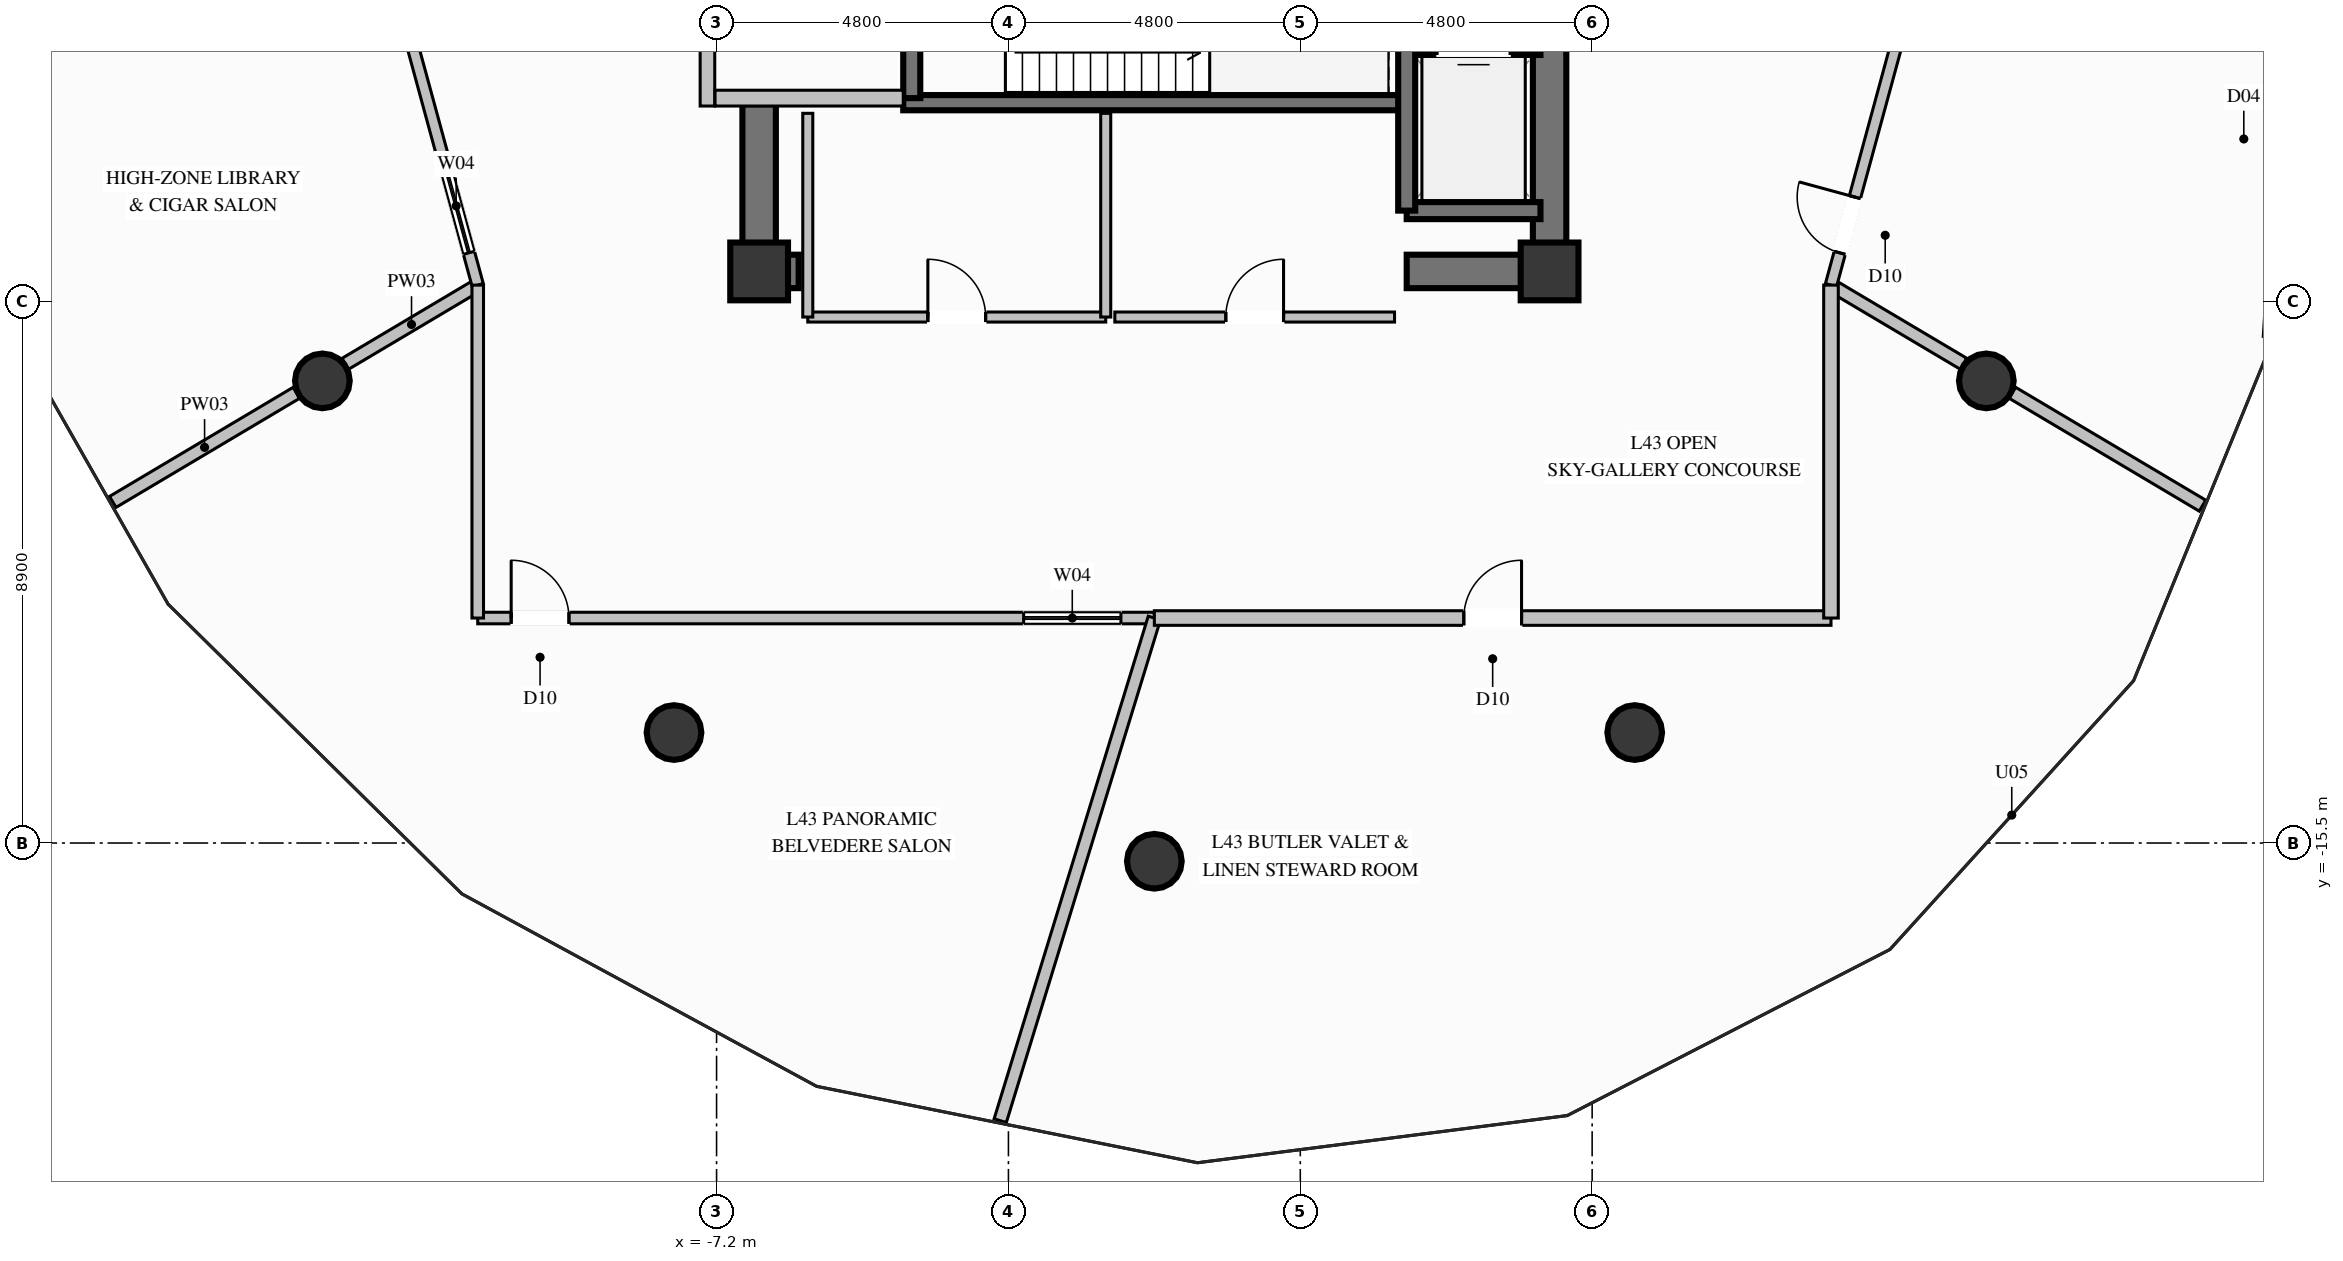
"""IFC4 building model, lengths in metres.
Left out: names, types, materials, properties, quantities, classifications, styles, units other than length and angle.
Written with IfcOpenShell. Run it as: python <this file> out.ifc"""

import sys

from ifc_helpers import new_model, si_unit, direction, frame, frame_2d, origin, origin_2d, place, context, subcontext, project, spatial, rectangle, circle, extrude, element, fill, save


model = new_model("IFC4")
c1 = context("Model", 3, precision=1e-05, world=origin(), true_north=direction((0.0, 1.0)))
c2 = subcontext(c1, "Body", "Model", "MODEL_VIEW")
j1 = project(units=[si_unit("LENGTHUNIT", "METRE"), si_unit("PLANEANGLEUNIT", "RADIAN")], contexts=[c1])
p1 = place(None, origin())
s1 = spatial("IfcSite", under=j1, at=p1, CompositionType="ELEMENT")
p2 = place(p1, origin())
s2 = spatial("IfcBuilding", under=s1, at=p2, CompositionType="ELEMENT")
p3 = place(p2, frame((0.0, 0.0, 168.6)))
s3 = spatial("IfcBuildingStorey", under=s2, at=p3, CompositionType="ELEMENT", Elevation=168.6)
for number, where, z_axis, x_axis in (
    (1, (-6.5, -6.1, 0.0), (0.0, 0.0, 1.0), (1.0, 0.0, 0.0)),
    (2, (6.5, -6.1, 0.0), (0.0, 0.0, 1.0), (1.0, 0.0, 0.0)),
):
    element("IfcColumn", number, at=place(p3, frame(where, z_axis=z_axis, x_axis=x_axis)), inside=s3, PredefinedType="COLUMN", context=c2, shape_type="SweptSolid", body=[
        extrude(rectangle(XDim=0.95, YDim=0.95, at=origin_2d()), origin(), (0.0, 0.0, 1.0), 4.6),
    ])
p4 = place(p3, frame((-4.13, -3.325, 0.0), z_axis=(0.0, 0.0, 1.0), x_axis=(1.0, 0.0, 0.0)))
e3 = element("IfcWall", 3, at=p4, inside=s3, PredefinedType="SOLIDWALL", context=c2, shape_type="SweptSolid", body=[
    extrude(rectangle(XDim=8.26, YDim=0.25, at=frame_2d((4.13, 0.0))), origin(), (0.0, 0.0, 1.0), 4.6),
])
p5 = place(p3, frame((-6.225, -6.1, 0.0), z_axis=(0.0, 0.0, 1.0), x_axis=(1.0, 0.0, 0.0)))
e4 = element("IfcWall", 4, at=p5, inside=s3, PredefinedType="SHEAR", context=c2, shape_type="SweptSolid", body=[
    extrude(rectangle(XDim=0.375, YDim=0.55, at=frame_2d((0.188, 0.0))), origin(), (0.0, 0.0, 1.0), 4.6),
])
p6 = place(p3, frame((4.15, -6.1, 0.0), z_axis=(0.0, 0.0, 1.0), x_axis=(1.0, 0.0, 0.0)))
e5 = element("IfcWall", 5, at=p6, inside=s3, PredefinedType="SHEAR", context=c2, shape_type="SweptSolid", body=[
    extrude(rectangle(XDim=2.075, YDim=0.55, at=frame_2d((1.038, 0.0))), origin(), (0.0, 0.0, 1.0), 4.6),
])
p7 = place(p3, frame((-6.5, -6.375, 0.0), z_axis=(0.0, 0.0, 1.0), x_axis=(0.0, 1.0, 0.0)))
e6 = element("IfcWall", 6, at=p7, inside=s3, PredefinedType="SHEAR", context=c2, shape_type="SweptSolid", body=[
    extrude(rectangle(XDim=3.025, YDim=0.55, at=frame_2d((1.512, 0.0))), origin(), (0.0, 0.0, 1.0), 4.6),
])
p8 = place(p3, frame((6.5, -6.375, 0.0), z_axis=(0.0, 0.0, 1.0), x_axis=(0.0, 1.0, 0.0)))
e7 = element("IfcWall", 7, at=p8, inside=s3, PredefinedType="SHEAR", context=c2, shape_type="SweptSolid", body=[
    extrude(rectangle(XDim=4.025, YDim=0.55, at=frame_2d((2.012, 0.0))), origin(), (0.0, 0.0, 1.0), 4.6),
])
for number, where, z_axis, x_axis in (
    (8, (-13.683, -7.9, 0.0), (0.0, 0.0, 1.0), (1.0, 0.0, 0.0)),
    (9, (-7.9, -13.683, 0.0), (0.0, 0.0, 1.0), (1.0, 0.0, 0.0)),
    (10, (0.0, -15.8, 0.0), (0.0, 0.0, 1.0), (1.0, 0.0, 0.0)),
    (11, (7.9, -13.683, 0.0), (0.0, 0.0, 1.0), (1.0, 0.0, 0.0)),
    (12, (13.683, -7.9, 0.0), (0.0, 0.0, 1.0), (1.0, 0.0, 0.0)),
):
    element("IfcColumn", number, at=place(p3, frame(where, z_axis=z_axis, x_axis=x_axis)), inside=s3, PredefinedType="COLUMN", context=c2, shape_type="SweptSolid", body=[
        extrude(circle(Radius=0.45, at=origin_2d()), origin(), (0.0, 0.0, 1.0), 4.6),
    ])
p9 = place(p3, frame((4.15, -5.1, 0.0), z_axis=(0.0, 0.0, 1.0), x_axis=(1.0, 0.0, 0.0)))
e13 = element("IfcWall", 13, at=p9, inside=s3, PredefinedType="SOLIDWALL", context=c2, shape_type="SweptSolid", body=[
    extrude(rectangle(XDim=2.2, YDim=0.28, at=frame_2d((1.1, 0.0))), origin(), (0.0, 0.0, 1.0), 4.36),
])
p10 = place(p3, frame((6.35, -2.4, 0.0), z_axis=(0.0, 0.0, 1.0), x_axis=(-1.0, 0.0, 0.0)))
e14 = element("IfcWall", 14, at=p10, inside=s3, PredefinedType="SOLIDWALL", context=c2, shape_type="SweptSolid", body=[
    extrude(rectangle(XDim=2.2, YDim=0.28, at=frame_2d((1.1, 0.0))), origin(), (0.0, 0.0, 1.0), 4.36),
])
p11 = place(p10, frame((0.5, 0.0, 0.0)))
e15 = element("IfcOpeningElement", 15, at=p11, cuts=e14, PredefinedType="OPENING", context=c2, shape_type="SweptSolid", body=[
    extrude(rectangle(XDim=1.2, YDim=2.2, at=frame_2d((0.6, 1.1))), frame((0.0, 0.15, 0.0), z_axis=(0.0, -1.0, 0.0), x_axis=(1.0, 0.0, 0.0)), (0.0, 0.0, 1.0), 0.3),
])
p12 = place(p3, frame((4.15, -2.4, 0.0), z_axis=(0.0, 0.0, 1.0), x_axis=(0.0, -1.0, 0.0)))
e16 = element("IfcWall", 16, at=p12, inside=s3, PredefinedType="SOLIDWALL", context=c2, shape_type="SweptSolid", body=[
    extrude(rectangle(XDim=2.7, YDim=0.28, at=frame_2d((1.35, 0.0))), origin(), (0.0, 0.0, 1.0), 4.36),
])
p13 = place(p3, frame((-3.99, -3.25, 0.0), z_axis=(0.0, 0.0, 1.0), x_axis=(0.0, 1.0, 0.0)))
e17 = element("IfcWall", 17, at=p13, inside=s3, PredefinedType="SOLIDWALL", context=c2, shape_type="SweptSolid", body=[
    extrude(rectangle(XDim=5.46, YDim=0.28, at=frame_2d((2.73, 0.0))), origin(), (0.0, 0.0, 1.0), 4.36),
])
p14 = place(p13, frame((0.937, 0.0, 0.0)))
e18 = element("IfcOpeningElement", 18, at=p14, cuts=e17, PredefinedType="OPENING", context=c2, shape_type="SweptSolid", body=[
    extrude(rectangle(XDim=1.2, YDim=2.2, at=frame_2d((0.6, 1.1))), frame((0.0, 0.15, 0.0), z_axis=(0.0, -1.0, 0.0), x_axis=(1.0, 0.0, 0.0)), (0.0, 0.0, 1.0), 0.3),
])
p15 = place(p3, frame((-7.35, -3.38, 0.0), z_axis=(0.0, 0.0, 1.0), x_axis=(0.0, 1.0, 0.0)))
e19 = element("IfcWall", 19, at=p15, inside=s3, PredefinedType="PARTITIONING", context=c2, shape_type="SweptSolid", body=[
    extrude(rectangle(XDim=5.72, YDim=0.24, at=frame_2d((2.86, 0.0))), origin(), (0.0, 0.0, 1.0), 3.245),
])
p16 = place(p15, frame((1.599, 0.0, 0.0)))
e20 = element("IfcOpeningElement", 20, at=p16, cuts=e19, PredefinedType="OPENING", context=c2, shape_type="SweptSolid", body=[
    extrude(rectangle(XDim=1.15, YDim=2.2, at=frame_2d((0.575, 1.1))), frame((0.0, 0.13, 0.0), z_axis=(0.0, -1.0, 0.0), x_axis=(1.0, 0.0, 0.0)), (0.0, 0.0, 1.0), 0.26),
])
p17 = place(p3, frame((-7.225, -3.25, 0.0), z_axis=(0.0, 0.0, 1.0), x_axis=(1.0, 0.0, 0.0)))
e21 = element("IfcWall", 21, at=p17, inside=s3, PredefinedType="PARTITIONING", context=c2, shape_type="SweptSolid", body=[
    extrude(rectangle(XDim=3.095, YDim=0.26, at=frame_2d((1.548, 0.0))), origin(), (0.0, 0.0, 1.0), 4.36),
])
p18 = place(p3, frame((-5.7, -6.85, 0.0), z_axis=(0.0, 0.0, 1.0), x_axis=(1.0, 0.0, 0.0)))
e22 = element("IfcWall", 22, at=p18, inside=s3, PredefinedType="PARTITIONING", context=c2, shape_type="SweptSolid", body=[
    extrude(rectangle(XDim=4.9, YDim=0.165, at=frame_2d((2.45, 0.0))), origin(), (0.0, 0.0, 1.0), 3.245),
])
p19 = place(p18, frame((1.975, 0.0, 0.0)))
e23 = element("IfcOpeningElement", 23, at=p19, cuts=e22, PredefinedType="OPENING", context=c2, shape_type="SweptSolid", body=[
    extrude(rectangle(XDim=0.95, YDim=2.1, at=frame_2d((0.475, 1.05))), frame((0.0, 0.093, 0.0), z_axis=(0.0, -1.0, 0.0), x_axis=(1.0, 0.0, 0.0)), (0.0, 0.0, 1.0), 0.185),
])
p20 = place(p3, frame((-0.8, -6.85, 0.0), z_axis=(0.0, 0.0, 1.0), x_axis=(0.0, 1.0, 0.0)))
e24 = element("IfcWall", 24, at=p20, inside=s3, PredefinedType="PARTITIONING", context=c2, shape_type="SweptSolid", body=[
    extrude(rectangle(XDim=3.35, YDim=0.165, at=frame_2d((1.675, 0.0))), origin(), (0.0, 0.0, 1.0), 4.36),
])
p21 = place(p3, frame((-5.7, -3.5, 0.0), z_axis=(0.0, 0.0, 1.0), x_axis=(0.0, -1.0, 0.0)))
e25 = element("IfcWall", 25, at=p21, inside=s3, PredefinedType="PARTITIONING", context=c2, shape_type="SweptSolid", body=[
    extrude(rectangle(XDim=3.35, YDim=0.165, at=frame_2d((1.675, 0.0))), origin(), (0.0, 0.0, 1.0), 3.245),
])
p22 = place(p3, frame((-0.65, -6.85, 0.0), z_axis=(0.0, 0.0, 1.0), x_axis=(1.0, 0.0, 0.0)))
e26 = element("IfcWall", 26, at=p22, inside=s3, PredefinedType="PARTITIONING", context=c2, shape_type="SweptSolid", body=[
    extrude(rectangle(XDim=4.6, YDim=0.165, at=frame_2d((2.3, 0.0))), origin(), (0.0, 0.0, 1.0), 3.245),
])
p23 = place(p22, frame((1.825, 0.0, 0.0)))
e27 = element("IfcOpeningElement", 27, at=p23, cuts=e26, PredefinedType="OPENING", context=c2, shape_type="SweptSolid", body=[
    extrude(rectangle(XDim=0.95, YDim=2.1, at=frame_2d((0.475, 1.05))), frame((0.0, 0.093, 0.0), z_axis=(0.0, -1.0, 0.0), x_axis=(1.0, 0.0, 0.0)), (0.0, 0.0, 1.0), 0.185),
])
p24 = place(p3, frame((-11.128, -6.325, 0.0), z_axis=(0.0, 0.0, 1.0), x_axis=(-0.85972118737, -0.510763624377, 0.0)))
e28 = element("IfcWall", 28, at=p24, inside=s3, PredefinedType="PARTITIONING", context=c2, shape_type="SweptSolid", body=[
    extrude(rectangle(XDim=2.533, YDim=0.21, at=frame_2d((1.267, 0.0))), origin(), (0.0, 0.0, 1.0), 3.877),
])
p25 = place(p3, frame((-14.11, -8.096, 0.0), z_axis=(0.0, 0.0, 1.0), x_axis=(-0.859673605407, -0.510843706203, 0.0)))
e29 = element("IfcWall", 29, at=p25, inside=s3, PredefinedType="PARTITIONING", context=c2, shape_type="SweptSolid", body=[
    extrude(rectangle(XDim=3.514, YDim=0.21, at=frame_2d((1.757, 0.0))), origin(), (0.0, 0.0, 1.0), 4.36),
])
p26 = place(p3, frame((11.128, -6.325, 0.0), z_axis=(0.0, 0.0, 1.0), x_axis=(0.859990866092, -0.510309425975, 0.0)))
e30 = element("IfcWall", 30, at=p26, inside=s3, PredefinedType="PARTITIONING", context=c2, shape_type="SweptSolid", body=[
    extrude(rectangle(XDim=2.534, YDim=0.21, at=frame_2d((1.267, 0.0))), origin(), (0.0, 0.0, 1.0), 3.877),
])
p27 = place(p3, frame((14.11, -8.095, 0.0), z_axis=(0.0, 0.0, 1.0), x_axis=(0.859887888036, -0.510482928224, 0.0)))
e31 = element("IfcWall", 31, at=p27, inside=s3, PredefinedType="PARTITIONING", context=c2, shape_type="SweptSolid", body=[
    extrude(rectangle(XDim=3.638, YDim=0.21, at=frame_2d((1.819, 0.0))), origin(), (0.0, 0.0, 1.0), 4.36),
])
p28 = place(p3, frame((-12.85, 0.0, 0.0), z_axis=(0.0, 0.0, 1.0), x_axis=(0.262717156474, -0.964872890952, 0.0)))
e32 = element("IfcWall", 32, at=p28, inside=s3, PredefinedType="PARTITIONING", context=c2, shape_type="SweptSolid", body=[
    extrude(rectangle(XDim=6.555, YDim=0.19, at=frame_2d((3.278, 0.0))), origin(), (0.0, 0.0, 1.0), 4.36),
])
p29 = place(p28, frame((0.55, 0.0, 0.0)))
e33 = element("IfcOpeningElement", 33, at=p29, cuts=e32, PredefinedType="OPENING", context=c2, shape_type="SweptSolid", body=[
    extrude(rectangle(XDim=0.95, YDim=2.1, at=frame_2d((0.475, 1.05))), frame((0.0, 0.105, 0.0), z_axis=(0.0, -1.0, 0.0), x_axis=(1.0, 0.0, 0.0)), (0.0, 0.0, 1.0), 0.21),
])
p30 = place(p28, frame((4.405, 0.0, 0.9)))
e34 = element("IfcOpeningElement", 34, at=p30, cuts=e32, PredefinedType="OPENING", context=c2, shape_type="SweptSolid", body=[
    extrude(rectangle(XDim=1.6, YDim=1.4, at=frame_2d((0.8, 0.7))), frame((0.0, 0.105, 0.0), z_axis=(0.0, -1.0, 0.0), x_axis=(1.0, 0.0, 0.0)), (0.0, 0.0, 1.0), 0.21),
])
p31 = place(p3, frame((11.128, -6.325, 0.0), z_axis=(0.0, 0.0, 1.0), x_axis=(0.262717156474, 0.964872890952, 0.0)))
e35 = element("IfcWall", 35, at=p31, inside=s3, PredefinedType="PARTITIONING", context=c2, shape_type="SweptSolid", body=[
    extrude(rectangle(XDim=6.555, YDim=0.19, at=frame_2d((3.278, 0.0))), origin(), (0.0, 0.0, 1.0), 4.36),
])
p32 = place(p31, frame((0.55, 0.0, 0.0)))
e36 = element("IfcOpeningElement", 36, at=p32, cuts=e35, PredefinedType="OPENING", context=c2, shape_type="SweptSolid", body=[
    extrude(rectangle(XDim=0.95, YDim=2.1, at=frame_2d((0.475, 1.05))), frame((0.0, 0.105, 0.0), z_axis=(0.0, -1.0, 0.0), x_axis=(1.0, 0.0, 0.0)), (0.0, 0.0, 1.0), 0.21),
])
p33 = place(p31, frame((4.405, 0.0, 0.9)))
e37 = element("IfcOpeningElement", 37, at=p33, cuts=e35, PredefinedType="OPENING", context=c2, shape_type="SweptSolid", body=[
    extrude(rectangle(XDim=1.6, YDim=1.4, at=frame_2d((0.8, 0.7))), frame((0.0, 0.105, 0.0), z_axis=(0.0, -1.0, 0.0), x_axis=(1.0, 0.0, 0.0)), (0.0, 0.0, 1.0), 0.21),
])
p34 = place(p3, frame((-11.128, -11.8, 0.0), z_axis=(0.0, 0.0, 1.0), x_axis=(1.0, 0.0, 0.0)))
e38 = element("IfcWall", 38, at=p34, inside=s3, PredefinedType="PARTITIONING", context=c2, shape_type="SweptSolid", body=[
    extrude(rectangle(XDim=11.128, YDim=0.19, at=frame_2d((5.564, 0.0))), origin(), (0.0, 0.0, 1.0), 4.36),
])
p35 = place(p34, frame((0.55, 0.0, 0.0)))
e39 = element("IfcOpeningElement", 39, at=p35, cuts=e38, PredefinedType="OPENING", context=c2, shape_type="SweptSolid", body=[
    extrude(rectangle(XDim=0.95, YDim=2.1, at=frame_2d((0.475, 1.05))), frame((0.0, 0.105, 0.0), z_axis=(0.0, -1.0, 0.0), x_axis=(1.0, 0.0, 0.0)), (0.0, 0.0, 1.0), 0.21),
])
p36 = place(p34, frame((8.978, 0.0, 0.9)))
e40 = element("IfcOpeningElement", 40, at=p36, cuts=e38, PredefinedType="OPENING", context=c2, shape_type="SweptSolid", body=[
    extrude(rectangle(XDim=1.6, YDim=1.4, at=frame_2d((0.8, 0.7))), frame((0.0, 0.105, 0.0), z_axis=(0.0, -1.0, 0.0), x_axis=(1.0, 0.0, 0.0)), (0.0, 0.0, 1.0), 0.21),
])
p37 = place(p3, frame((-11.128, -6.325, 0.0), z_axis=(0.0, 0.0, 1.0), x_axis=(0.0, -1.0, 0.0)))
e41 = element("IfcWall", 41, at=p37, inside=s3, PredefinedType="PARTITIONING", context=c2, shape_type="SweptSolid", body=[
    extrude(rectangle(XDim=5.475, YDim=0.19, at=frame_2d((2.738, 0.0))), origin(), (0.0, 0.0, 1.0), 4.36),
])
p38 = place(p3, frame((0.0, -11.8, 0.0), z_axis=(0.0, 0.0, 1.0), x_axis=(-0.293194775158, -0.956052730669, 0.0)))
e42 = element("IfcWall", 42, at=p38, inside=s3, PredefinedType="PARTITIONING", context=c2, shape_type="SweptSolid", body=[
    extrude(rectangle(XDim=8.646, YDim=0.21, at=frame_2d((4.323, 0.0))), origin(), (0.0, 0.0, 1.0), 4.36),
])
p39 = place(p3, frame((0.0, -11.8, 0.0), z_axis=(0.0, 0.0, 1.0), x_axis=(1.0, 0.0, 0.0)))
e43 = element("IfcWall", 43, at=p39, inside=s3, PredefinedType="PARTITIONING", context=c2, shape_type="SweptSolid", body=[
    extrude(rectangle(XDim=11.128, YDim=0.24, at=frame_2d((5.564, 0.0))), origin(), (0.0, 0.0, 1.0), 4.36),
])
p40 = place(p39, frame((5.089, 0.0, 0.0)))
e44 = element("IfcOpeningElement", 44, at=p40, cuts=e43, PredefinedType="OPENING", context=c2, shape_type="SweptSolid", body=[
    extrude(rectangle(XDim=0.95, YDim=2.1, at=frame_2d((0.475, 1.05))), frame((0.0, 0.13, 0.0), z_axis=(0.0, -1.0, 0.0), x_axis=(1.0, 0.0, 0.0)), (0.0, 0.0, 1.0), 0.26),
])
p41 = place(p3, frame((11.128, -11.8, 0.0), z_axis=(0.0, 0.0, 1.0), x_axis=(0.0, 1.0, 0.0)))
e45 = element("IfcWall", 45, at=p41, inside=s3, PredefinedType="PARTITIONING", context=c2, shape_type="SweptSolid", body=[
    extrude(rectangle(XDim=5.475, YDim=0.24, at=frame_2d((2.738, 0.0))), origin(), (0.0, 0.0, 1.0), 4.36),
])
p42 = place(p19, origin())
e46 = element("IfcDoor", 46, at=p42, inside=s3, OperationType="SINGLE_SWING_LEFT", PredefinedType="DOOR", context=c2, shape_type="SweptSolid", body=[
    extrude(rectangle(XDim=0.95, YDim=2.1, at=frame_2d((0.475, 1.05))), frame((0.0, 0.025, 0.0), z_axis=(0.0, -1.0, 0.0), x_axis=(1.0, 0.0, 0.0)), (0.0, 0.0, 1.0), 0.05),
])
fill(e23, e46)
p43 = place(p23, origin())
e47 = element("IfcDoor", 47, at=p43, inside=s3, OperationType="SINGLE_SWING_RIGHT", PredefinedType="DOOR", context=c2, shape_type="SweptSolid", body=[
    extrude(rectangle(XDim=0.95, YDim=2.1, at=frame_2d((0.475, 1.05))), frame((0.0, 0.025, 0.0), z_axis=(0.0, -1.0, 0.0), x_axis=(1.0, 0.0, 0.0)), (0.0, 0.0, 1.0), 0.05),
])
fill(e27, e47)
p44 = place(p30, origin())
e48 = element("IfcWindow", 48, at=p44, inside=s3, PartitioningType="SINGLE_PANEL", PredefinedType="WINDOW", context=c2, shape_type="SweptSolid", body=[
    extrude(rectangle(XDim=1.6, YDim=1.4, at=frame_2d((0.8, 0.7))), frame((0.0, 0.03, 0.0), z_axis=(0.0, -1.0, 0.0), x_axis=(1.0, 0.0, 0.0)), (0.0, 0.0, 1.0), 0.06),
])
fill(e34, e48)
p45 = place(p32, origin())
e49 = element("IfcDoor", 49, at=p45, inside=s3, OperationType="SINGLE_SWING_RIGHT", PredefinedType="DOOR", context=c2, shape_type="SweptSolid", body=[
    extrude(rectangle(XDim=0.95, YDim=2.1, at=frame_2d((0.475, 1.05))), frame((0.0, 0.025, 0.0), z_axis=(0.0, -1.0, 0.0), x_axis=(1.0, 0.0, 0.0)), (0.0, 0.0, 1.0), 0.05),
])
fill(e36, e49)
p46 = place(p35, origin())
e50 = element("IfcDoor", 50, at=p46, inside=s3, OperationType="SINGLE_SWING_LEFT", PredefinedType="DOOR", context=c2, shape_type="SweptSolid", body=[
    extrude(rectangle(XDim=0.95, YDim=2.1, at=frame_2d((0.475, 1.05))), frame((0.0, 0.025, 0.0), z_axis=(0.0, -1.0, 0.0), x_axis=(1.0, 0.0, 0.0)), (0.0, 0.0, 1.0), 0.05),
])
fill(e39, e50)
p47 = place(p36, origin())
e51 = element("IfcWindow", 51, at=p47, inside=s3, PartitioningType="SINGLE_PANEL", PredefinedType="WINDOW", context=c2, shape_type="SweptSolid", body=[
    extrude(rectangle(XDim=1.6, YDim=1.4, at=frame_2d((0.8, 0.7))), frame((0.0, 0.03, 0.0), z_axis=(0.0, -1.0, 0.0), x_axis=(1.0, 0.0, 0.0)), (0.0, 0.0, 1.0), 0.06),
])
fill(e40, e51)
p48 = place(p40, origin())
e52 = element("IfcDoor", 52, at=p48, inside=s3, OperationType="SINGLE_SWING_RIGHT", PredefinedType="DOOR", context=c2, shape_type="SweptSolid", body=[
    extrude(rectangle(XDim=0.95, YDim=2.1, at=frame_2d((0.475, 1.05))), frame((0.0, 0.025, 0.0), z_axis=(0.0, -1.0, 0.0), x_axis=(1.0, 0.0, 0.0)), (0.0, 0.0, 1.0), 0.05),
])
fill(e44, e52)
save(model, sys.argv[1])
